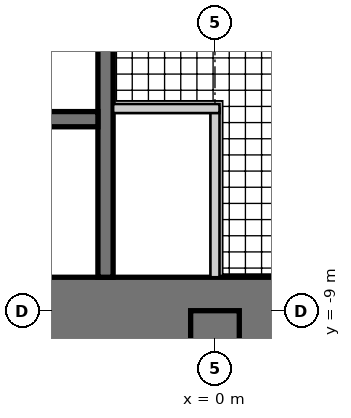
"""IFC4 building model, lengths in metres.
Left out: names, types, materials, properties, quantities, classifications, styles, units other than length and angle.
Written with IfcOpenShell. Run it as: python <this file> out.ifc"""

import sys

from ifc_helpers import new_model, si_unit, direction, frame, frame_2d, origin, place, context, subcontext, project, spatial, rectangle, extrude, element, fill, save


model = new_model("IFC4")
c1 = context("Model", 3, precision=1e-05, world=origin(), true_north=direction((0.0, 1.0)))
c2 = subcontext(c1, "Body", "Model", "MODEL_VIEW")
j1 = project(units=[si_unit("LENGTHUNIT", "METRE"), si_unit("PLANEANGLEUNIT", "RADIAN")], contexts=[c1])
p1 = place(None, origin())
s1 = spatial("IfcSite", under=j1, at=p1, CompositionType="ELEMENT")
p2 = place(p1, origin())
s2 = spatial("IfcBuilding", under=s1, at=p2, CompositionType="ELEMENT")
p3 = place(p2, frame((0.0, 0.0, 179.7)))
s3 = spatial("IfcBuildingStorey", under=s2, at=p3, CompositionType="ELEMENT", Elevation=179.7)
p4 = place(p3, frame((-9.0, -9.0, 0.0), z_axis=(0.0, 0.0, 1.0), x_axis=(1.0, 0.0, 0.0)))
e1 = element("IfcWall", 1, at=p4, inside=s3, PredefinedType="SHEAR", context=c2, shape_type="SweptSolid", body=[
    extrude(rectangle(XDim=18.0, YDim=1.1, at=frame_2d((9.0, 0.0))), origin(), (0.0, 0.0, 1.0), 3.4),
])
p5 = place(p4, frame((9.8, 0.0, 0.0)))
e2 = element("IfcOpeningElement", 2, at=p5, cuts=e1, PredefinedType="OPENING", context=c2, shape_type="SweptSolid", body=[
    extrude(rectangle(XDim=1.0, YDim=2.4, at=frame_2d((0.5, 1.2))), frame((0.0, 0.56, 0.0), z_axis=(0.0, -1.0, 0.0), x_axis=(1.0, 0.0, 0.0)), (0.0, 0.0, 1.0), 1.12),
])
p6 = place(p3, frame((-1.8, -1.875, 0.0), z_axis=(0.0, 0.0, 1.0), x_axis=(0.0, -1.0, 0.0)))
e3 = element("IfcWall", 3, at=p6, inside=s3, PredefinedType="SHEAR", context=c2, shape_type="SweptSolid", body=[
    extrude(rectangle(XDim=6.575, YDim=0.25, at=frame_2d((3.288, 0.0))), origin(), (0.0, 0.0, 1.0), 3.4),
])
p7 = place(p6, frame((1.875, 0.0, 0.0)))
e4 = element("IfcOpeningElement", 4, at=p7, cuts=e3, PredefinedType="OPENING", context=c2, shape_type="SweptSolid", body=[
    extrude(rectangle(XDim=1.6, YDim=2.4, at=frame_2d((0.8, 1.2))), frame((0.0, 0.135, 0.0), z_axis=(0.0, -1.0, 0.0), x_axis=(1.0, 0.0, 0.0)), (0.0, 0.0, 1.0), 0.27),
])
p8 = place(p3, frame((-1.925, -5.85, 0.0), z_axis=(0.0, 0.0, 1.0), x_axis=(-1.0, 0.0, 0.0)))
e5 = element("IfcWall", 5, at=p8, inside=s3, PredefinedType="SHEAR", context=c2, shape_type="SweptSolid", body=[
    extrude(rectangle(XDim=6.525, YDim=0.25, at=frame_2d((3.262, 0.0))), origin(), (0.0, 0.0, 1.0), 3.4),
])
p9 = place(p8, frame((0.471, 0.0, 0.0)))
e6 = element("IfcOpeningElement", 6, at=p9, cuts=e5, PredefinedType="OPENING", context=c2, shape_type="SweptSolid", body=[
    extrude(rectangle(XDim=1.1, YDim=2.2, at=frame_2d((0.55, 1.1))), frame((0.0, 0.135, 0.0), z_axis=(0.0, -1.0, 0.0), x_axis=(1.0, 0.0, 0.0)), (0.0, 0.0, 1.0), 0.27),
])
p10 = place(p8, frame((2.712, 0.0, 0.0)))
e7 = element("IfcOpeningElement", 7, at=p10, cuts=e5, PredefinedType="OPENING", context=c2, shape_type="SweptSolid", body=[
    extrude(rectangle(XDim=1.1, YDim=2.2, at=frame_2d((0.55, 1.1))), frame((0.0, 0.135, 0.0), z_axis=(0.0, -1.0, 0.0), x_axis=(1.0, 0.0, 0.0)), (0.0, 0.0, 1.0), 0.27),
])
p11 = place(p8, frame((4.954, 0.0, 0.0)))
e8 = element("IfcOpeningElement", 8, at=p11, cuts=e5, PredefinedType="OPENING", context=c2, shape_type="SweptSolid", body=[
    extrude(rectangle(XDim=1.1, YDim=2.2, at=frame_2d((0.55, 1.1))), frame((0.0, 0.135, 0.0), z_axis=(0.0, -1.0, 0.0), x_axis=(1.0, 0.0, 0.0)), (0.0, 0.0, 1.0), 0.27),
])
p12 = place(p3, frame((0.0, -9.0, 0.0), z_axis=(0.0, 0.0, 1.0), x_axis=(0.0, -1.0, 0.0)))
e9 = element("IfcWall", 9, at=p12, inside=s3, PredefinedType="SHEAR", context=c2, shape_type="SweptSolid", body=[
    extrude(rectangle(XDim=18.0, YDim=0.8, at=frame_2d((9.0, 0.0))), origin(), (0.0, 0.0, 1.0), 3.4),
])
p13 = place(p12, frame((3.95, 0.0, 0.0)))
e10 = element("IfcOpeningElement", 10, at=p13, cuts=e9, PredefinedType="OPENING", context=c2, shape_type="SweptSolid", body=[
    extrude(rectangle(XDim=1.0, YDim=2.15, at=frame_2d((0.5, 1.075))), frame((0.0, 0.41, 0.0), z_axis=(0.0, -1.0, 0.0), x_axis=(1.0, 0.0, 0.0)), (0.0, 0.0, 1.0), 0.82),
])
p14 = place(p12, frame((6.6, 0.0, 0.0)))
e11 = element("IfcOpeningElement", 11, at=p14, cuts=e9, PredefinedType="OPENING", context=c2, shape_type="SweptSolid", body=[
    extrude(rectangle(XDim=1.0, YDim=2.15, at=frame_2d((0.5, 1.075))), frame((0.0, 0.41, 0.0), z_axis=(0.0, -1.0, 0.0), x_axis=(1.0, 0.0, 0.0)), (0.0, 0.0, 1.0), 0.82),
])
p15 = place(p12, frame((13.25, 0.0, 0.0)))
e12 = element("IfcOpeningElement", 12, at=p15, cuts=e9, PredefinedType="OPENING", context=c2, shape_type="SweptSolid", body=[
    extrude(rectangle(XDim=1.0, YDim=2.2, at=frame_2d((0.5, 1.1))), frame((0.0, 0.41, 0.0), z_axis=(0.0, -1.0, 0.0), x_axis=(1.0, 0.0, 0.0)), (0.0, 0.0, 1.0), 0.82),
])
p16 = place(p3, frame((0.0, -5.675, 0.0), z_axis=(0.0, 0.0, 1.0), x_axis=(0.0, -1.0, 0.0)))
e13 = element("IfcWall", 13, at=p16, inside=s3, PredefinedType="PARTITIONING", context=c2, shape_type="SweptSolid", body=[
    extrude(rectangle(XDim=2.775, YDim=0.15, at=frame_2d((1.387, 0.0))), origin(), (0.0, 0.0, 1.0), 3.22),
])
p17 = place(p16, frame((0.4, 0.0, 0.0)))
e14 = element("IfcOpeningElement", 14, at=p17, cuts=e13, PredefinedType="OPENING", context=c2, shape_type="SweptSolid", body=[
    extrude(rectangle(XDim=1.0, YDim=2.1, at=frame_2d((0.5, 1.05))), frame((0.0, 0.085, 0.0), z_axis=(0.0, -1.0, 0.0), x_axis=(1.0, 0.0, 0.0)), (0.0, 0.0, 1.0), 0.17),
])
p18 = place(p3, frame((-1.675, -5.675, 0.0), z_axis=(0.0, 0.0, 1.0), x_axis=(1.0, 0.0, 0.0)))
e15 = element("IfcWall", 15, at=p18, inside=s3, PredefinedType="PARTITIONING", context=c2, shape_type="SweptSolid", body=[
    extrude(rectangle(XDim=1.75, YDim=0.15, at=frame_2d((0.875, 0.0))), origin(), (0.0, 0.0, 1.0), 3.22),
])
p19 = place(p17, frame((1.0, 0.0, 0.0), z_axis=(0.0, 0.0, 1.0), x_axis=(-1.0, 0.0, 0.0)))
e16 = element("IfcDoor", 16, at=p19, inside=s3, OperationType="SINGLE_SWING_RIGHT", PredefinedType="DOOR", context=c2, shape_type="SweptSolid", body=[
    extrude(rectangle(XDim=1.0, YDim=2.1, at=frame_2d((0.5, 1.05))), frame((0.0, 0.025, 0.0), z_axis=(0.0, -1.0, 0.0), x_axis=(1.0, 0.0, 0.0)), (0.0, 0.0, 1.0), 0.05),
])
fill(e14, e16)
p20 = place(p5, origin())
e17 = element("IfcDoor", 17, at=p20, inside=s3, OperationType="SINGLE_SWING_RIGHT", PredefinedType="DOOR", context=c2, shape_type="SweptSolid", body=[
    extrude(rectangle(XDim=1.0, YDim=2.4, at=frame_2d((0.5, 1.2))), frame((0.0, 0.055, 0.0), z_axis=(0.0, -1.0, 0.0), x_axis=(1.0, 0.0, 0.0)), (0.0, 0.0, 1.0), 0.05),
])
fill(e2, e17)
p21 = place(p9, origin())
e18 = element("IfcDoor", 18, at=p21, inside=s3, OperationType="DOUBLE_DOOR_SLIDING", PredefinedType="DOOR", context=c2, shape_type="SweptSolid", body=[
    extrude(rectangle(XDim=1.1, YDim=2.2, at=frame_2d((0.55, 1.1))), frame((0.0, 0.025, 0.0), z_axis=(0.0, -1.0, 0.0), x_axis=(1.0, 0.0, 0.0)), (0.0, 0.0, 1.0), 0.05),
])
fill(e6, e18)
p22 = place(p7, origin())
e19 = element("IfcDoor", 19, at=p22, inside=s3, OperationType="DOUBLE_DOOR_DOUBLE_SWING", PredefinedType="DOOR", context=c2, shape_type="SweptSolid", body=[
    extrude(rectangle(XDim=1.6, YDim=2.4, at=frame_2d((0.8, 1.2))), frame((0.0, 0.025, 0.0), z_axis=(0.0, -1.0, 0.0), x_axis=(1.0, 0.0, 0.0)), (0.0, 0.0, 1.0), 0.05),
])
fill(e4, e19)
save(model, sys.argv[1])
